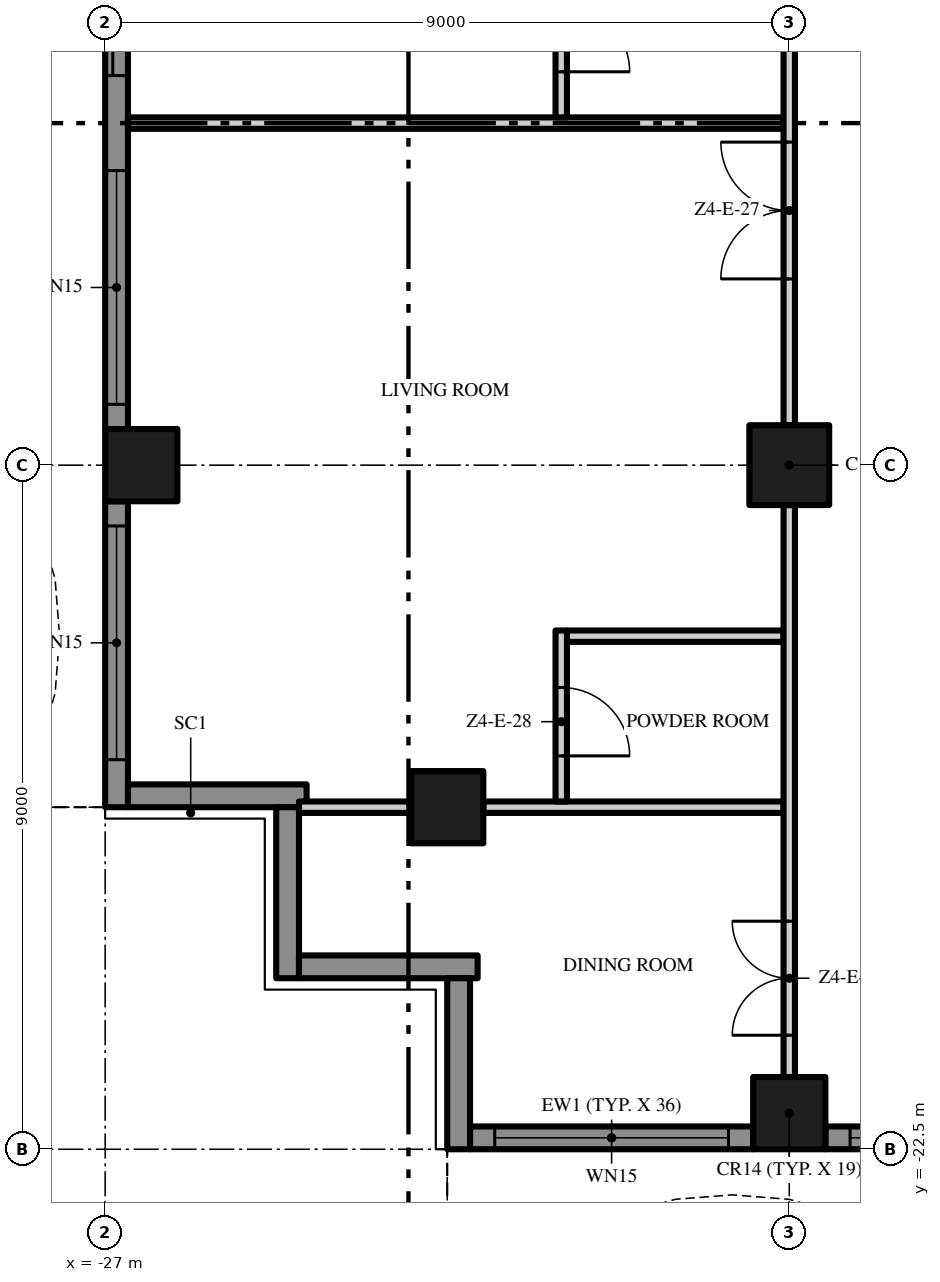
"""IFC4 building model, lengths in metres.
Left out: names, types, materials, properties, quantities, classifications, styles, units other than length and angle.
Written with IfcOpenShell. Run it as: python <this file> out.ifc"""

import sys

from ifc_helpers import new_model, si_unit, direction, frame, frame_2d, origin, origin_2d, place, context, subcontext, project, spatial, polyline, rectangle, outline, extrude, element, fill, save


model = new_model("IFC4")
c1 = context("Model", 3, precision=1e-05, world=origin(), true_north=direction((0.0, 1.0)))
c2 = subcontext(c1, "Body", "Model", "MODEL_VIEW")
j1 = project(units=[si_unit("LENGTHUNIT", "METRE"), si_unit("PLANEANGLEUNIT", "RADIAN")], contexts=[c1])
p1 = place(None, origin())
s1 = spatial("IfcSite", under=j1, at=p1, CompositionType="ELEMENT")
p2 = place(p1, origin())
s2 = spatial("IfcBuilding", under=s1, at=p2, CompositionType="ELEMENT")
p3 = place(p2, frame((0.0, 0.0, 226.2)))
s3 = spatial("IfcBuildingStorey", under=s2, at=p3, CompositionType="ELEMENT", Elevation=226.2)
p4 = place(p3, frame((-18.0, -13.5, 0.0), z_axis=(0.0, 0.0, 1.0), x_axis=(1.0, 0.0, 0.0)))
e1 = element("IfcColumn", 1, at=p4, inside=s3, PredefinedType="COLUMN", context=c2, shape_type="SweptSolid", body=[
    extrude(rectangle(XDim=1.05, YDim=1.05, at=origin_2d()), origin(), (0.0, 0.0, 1.0), 3.5),
])
for number, where, z_axis, x_axis in (
    (2, (-18.0, -22.025, 0.0), (0.0, 0.0, 1.0), (1.0, 0.0, 0.0)),
    (3, (-26.525, -13.5, 0.0), (0.0, 0.0, 1.0), (1.0, 0.0, 0.0)),
    (4, (-22.5, -18.0, 0.0), (0.0, 0.0, 1.0), (1.0, 0.0, 0.0)),
):
    element("IfcColumn", number, at=place(p3, frame(where, z_axis=z_axis, x_axis=x_axis)), inside=s3, PredefinedType="COLUMN", context=c2, shape_type="SweptSolid", body=[
        extrude(rectangle(XDim=0.95, YDim=0.95, at=origin_2d()), origin(), (0.0, 0.0, 1.0), 3.5),
    ])
p5 = place(p3, frame((-18.475, -22.35, 0.0), z_axis=(0.0, 0.0, 1.0), x_axis=(-1.0, 0.0, 0.0)))
e5 = element("IfcWall", 5, at=p5, inside=s3, PredefinedType="SOLIDWALL", context=c2, shape_type="SweptSolid", body=[
    extrude(rectangle(XDim=3.725, YDim=0.3, at=frame_2d((1.863, 0.0))), origin(), (0.0, 0.0, 1.0), 3.5),
])
p6 = place(p5, frame((0.325, 0.0, 0.45)))
e6 = element("IfcOpeningElement", 6, at=p6, cuts=e5, PredefinedType="OPENING", context=c2, shape_type="SweptSolid", body=[
    extrude(rectangle(XDim=3.075, YDim=2.65, at=frame_2d((1.538, 1.325))), frame((0.0, 0.16, 0.0), z_axis=(0.0, -1.0, 0.0), x_axis=(1.0, 0.0, 0.0)), (0.0, 0.0, 1.0), 0.32),
])
p7 = place(p3, frame((-9.475, -22.35, 0.0), z_axis=(0.0, 0.0, 1.0), x_axis=(-1.0, 0.0, 0.0)))
e7 = element("IfcWall", 7, at=p7, inside=s3, PredefinedType="SOLIDWALL", context=c2, shape_type="SweptSolid", body=[
    extrude(rectangle(XDim=8.05, YDim=0.3, at=frame_2d((4.025, 0.0))), origin(), (0.0, 0.0, 1.0), 3.5),
])
p8 = place(p7, frame((4.65, 0.0, 0.45)))
e8 = element("IfcOpeningElement", 8, at=p8, cuts=e7, PredefinedType="OPENING", context=c2, shape_type="SweptSolid", body=[
    extrude(rectangle(XDim=3.075, YDim=2.65, at=frame_2d((1.538, 1.325))), frame((0.0, 0.16, 0.0), z_axis=(0.0, -1.0, 0.0), x_axis=(1.0, 0.0, 0.0)), (0.0, 0.0, 1.0), 0.32),
])
p9 = place(p7, frame((0.325, 0.0, 0.0)))
e9 = element("IfcOpeningElement", 9, at=p9, cuts=e7, PredefinedType="OPENING", context=c2, shape_type="SweptSolid", body=[
    extrude(rectangle(XDim=3.075, YDim=2.4, at=frame_2d((1.538, 1.2))), frame((0.0, 0.16, 0.0), z_axis=(0.0, -1.0, 0.0), x_axis=(1.0, 0.0, 0.0)), (0.0, 0.0, 1.0), 0.32),
])
p10 = place(p3, frame((-26.85, -13.025, 0.0), z_axis=(0.0, 0.0, 1.0), x_axis=(0.0, 1.0, 0.0)))
e10 = element("IfcWall", 10, at=p10, inside=s3, PredefinedType="SOLIDWALL", context=c2, shape_type="SweptSolid", body=[
    extrude(rectangle(XDim=8.05, YDim=0.3, at=frame_2d((4.025, 0.0))), origin(), (0.0, 0.0, 1.0), 3.5),
])
p11 = place(p10, frame((4.65, 0.0, 0.0)))
e11 = element("IfcOpeningElement", 11, at=p11, cuts=e10, PredefinedType="OPENING", context=c2, shape_type="SweptSolid", body=[
    extrude(rectangle(XDim=3.075, YDim=2.4, at=frame_2d((1.538, 1.2))), frame((0.0, 0.16, 0.0), z_axis=(0.0, -1.0, 0.0), x_axis=(1.0, 0.0, 0.0)), (0.0, 0.0, 1.0), 0.32),
])
p12 = place(p10, frame((0.325, 0.0, 0.45)))
e12 = element("IfcOpeningElement", 12, at=p12, cuts=e10, PredefinedType="OPENING", context=c2, shape_type="SweptSolid", body=[
    extrude(rectangle(XDim=3.075, YDim=2.65, at=frame_2d((1.538, 1.325))), frame((0.0, 0.16, 0.0), z_axis=(0.0, -1.0, 0.0), x_axis=(1.0, 0.0, 0.0)), (0.0, 0.0, 1.0), 0.32),
])
p13 = place(p3, frame((-26.85, -18.0, 0.0), z_axis=(0.0, 0.0, 1.0), x_axis=(0.0, 1.0, 0.0)))
e13 = element("IfcWall", 13, at=p13, inside=s3, PredefinedType="SOLIDWALL", context=c2, shape_type="SweptSolid", body=[
    extrude(rectangle(XDim=4.025, YDim=0.3, at=frame_2d((2.013, 0.0))), origin(), (0.0, 0.0, 1.0), 3.5),
])
p14 = place(p13, frame((0.625, 0.0, 0.45)))
e14 = element("IfcOpeningElement", 14, at=p14, cuts=e13, PredefinedType="OPENING", context=c2, shape_type="SweptSolid", body=[
    extrude(rectangle(XDim=3.075, YDim=2.65, at=frame_2d((1.538, 1.325))), frame((0.0, 0.16, 0.0), z_axis=(0.0, -1.0, 0.0), x_axis=(1.0, 0.0, 0.0)), (0.0, 0.0, 1.0), 0.32),
])
p15 = place(p3, frame((-24.35, -17.85, 0.0), z_axis=(0.0, 0.0, 1.0), x_axis=(-1.0, 0.0, 0.0)))
e15 = element("IfcWall", 15, at=p15, inside=s3, PredefinedType="SOLIDWALL", context=c2, shape_type="SweptSolid", body=[
    extrude(rectangle(XDim=2.35, YDim=0.3, at=frame_2d((1.175, 0.0))), origin(), (0.0, 0.0, 1.0), 3.5),
])
p16 = place(p3, frame((-24.6, -20.25, 0.0), z_axis=(0.0, 0.0, 1.0), x_axis=(0.0, 1.0, 0.0)))
e16 = element("IfcWall", 16, at=p16, inside=s3, PredefinedType="SOLIDWALL", context=c2, shape_type="SweptSolid", body=[
    extrude(rectangle(XDim=2.25, YDim=0.3, at=frame_2d((1.125, 0.0))), origin(), (0.0, 0.0, 1.0), 3.5),
])
p17 = place(p3, frame((-22.1, -20.1, 0.0), z_axis=(0.0, 0.0, 1.0), x_axis=(-1.0, 0.0, 0.0)))
e17 = element("IfcWall", 17, at=p17, inside=s3, PredefinedType="SOLIDWALL", context=c2, shape_type="SweptSolid", body=[
    extrude(rectangle(XDim=2.35, YDim=0.3, at=frame_2d((1.175, 0.0))), origin(), (0.0, 0.0, 1.0), 3.5),
])
p18 = place(p3, frame((-22.35, -22.5, 0.0), z_axis=(0.0, 0.0, 1.0), x_axis=(0.0, 1.0, 0.0)))
e18 = element("IfcWall", 18, at=p18, inside=s3, PredefinedType="SOLIDWALL", context=c2, shape_type="SweptSolid", body=[
    extrude(rectangle(XDim=2.25, YDim=0.3, at=frame_2d((1.125, 0.0))), origin(), (0.0, 0.0, 1.0), 3.5),
])
p19 = place(p3, origin())
e19 = element("IfcWall", 19, at=p19, inside=s3, PredefinedType="USERDEFINED", context=c2, shape_type="SweptSolid", body=[
    extrude(outline(polyline([(-22.5, -24.3), (-21.0, -23.595), (-19.5, -23.159), (-18.75, -23.1), (-18.0, -23.159), (-16.5, -23.595), (-15.0, -24.3), (-13.5, -25.005), (-12.0, -25.441), (-11.25, -25.5), (-10.5, -25.441), (-9.0, -25.005), (-7.5, -24.3), (-6.0, -23.595), (-4.5, -23.159), (-3.75, -23.1), (-3.0, -23.159), (-1.5, -23.595), (0.0, -24.3), (1.5, -25.005), (3.0, -25.441), (3.75, -25.5), (4.5, -25.441), (6.0, -25.005), (7.5, -24.3), (9.0, -23.595), (10.5, -23.159), (11.25, -23.1), (12.0, -23.159), (13.5, -23.595), (15.0, -24.3), (16.5, -25.005), (18.0, -25.441), (18.75, -25.5), (19.5, -25.441), (21.0, -25.005), (22.5, -24.3), (22.394, -24.074), (20.911, -24.771), (19.455, -25.194), (18.75, -25.249), (18.045, -25.194), (16.589, -24.771), (15.106, -24.074), (13.589, -23.36), (12.045, -22.911), (11.25, -22.849), (10.455, -22.911), (8.911, -23.36), (7.394, -24.074), (5.911, -24.771), (4.455, -25.194), (3.75, -25.249), (3.045, -25.194), (1.589, -24.771), (0.106, -24.074), (-1.411, -23.36), (-2.955, -22.911), (-3.75, -22.849), (-4.545, -22.911), (-6.089, -23.36), (-7.606, -24.074), (-9.089, -24.771), (-10.545, -25.194), (-11.25, -25.249), (-11.955, -25.194), (-13.411, -24.771), (-14.894, -24.074), (-16.411, -23.36), (-17.955, -22.911), (-18.75, -22.849), (-19.545, -22.911), (-21.089, -23.36), (-22.606, -24.074), (-22.5, -24.3)])), origin(), (0.0, 0.0, 1.0), 0.9),
])
p20 = place(p3, origin())
e20 = element("IfcWall", 20, at=p20, inside=s3, PredefinedType="USERDEFINED", context=c2, shape_type="SweptSolid", body=[
    extrude(outline(polyline([(-28.8, 18.0), (-28.095, 16.5), (-27.659, 15.0), (-27.6, 14.25), (-27.659, 13.5), (-28.095, 12.0), (-28.8, 10.5), (-29.505, 9.0), (-29.941, 7.5), (-30.0, 6.75), (-29.941, 6.0), (-29.505, 4.5), (-28.8, 3.0), (-28.095, 1.5), (-27.659, 0.0), (-27.6, -0.75), (-27.659, -1.5), (-28.095, -3.0), (-28.8, -4.5), (-29.505, -6.0), (-29.941, -7.5), (-30.0, -8.25), (-29.941, -9.0), (-29.505, -10.5), (-28.8, -12.0), (-28.095, -13.5), (-27.659, -15.0), (-27.6, -15.75), (-27.659, -16.5), (-28.095, -18.0), (-27.855, -18.07), (-27.411, -16.545), (-27.349, -15.75), (-27.411, -14.955), (-27.86, -13.411), (-28.574, -11.894), (-29.271, -10.411), (-29.694, -8.955), (-29.749, -8.25), (-29.694, -7.545), (-29.271, -6.089), (-28.574, -4.606), (-27.86, -3.089), (-27.411, -1.545), (-27.349, -0.75), (-27.411, 0.045), (-27.86, 1.589), (-28.574, 3.106), (-29.271, 4.589), (-29.694, 6.045), (-29.749, 6.75), (-29.694, 7.455), (-29.271, 8.911), (-28.574, 10.394), (-27.86, 11.911), (-27.411, 13.455), (-27.349, 14.25), (-27.411, 15.045), (-27.86, 16.589), (-28.574, 18.106), (-28.8, 18.0)])), origin(), (0.0, 0.0, 1.0), 0.9),
])
p21 = place(p3, frame((-24.45, -18.0, 0.0), z_axis=(0.0, 0.0, 1.0), x_axis=(1.0, 0.0, 0.0)))
e21 = element("IfcWall", 21, at=p21, inside=s3, PredefinedType="PARTITIONING", context=c2, shape_type="SweptSolid", body=[
    extrude(rectangle(XDim=1.475, YDim=0.15, at=frame_2d((0.738, 0.0))), origin(), (0.0, 0.0, 1.0), 3.5),
])
p22 = place(p3, frame((-22.025, -18.0, 0.0), z_axis=(0.0, 0.0, 1.0), x_axis=(1.0, 0.0, 0.0)))
e22 = element("IfcWall", 22, at=p22, inside=s3, PredefinedType="PARTITIONING", context=c2, shape_type="SweptSolid", body=[
    extrude(rectangle(XDim=3.95, YDim=0.15, at=frame_2d((1.975, 0.0))), origin(), (0.0, 0.0, 1.0), 3.5),
])
p23 = place(p3, frame((-20.925, -15.75, 0.0), z_axis=(0.0, 0.0, 1.0), x_axis=(1.0, 0.0, 0.0)))
e23 = element("IfcWall", 23, at=p23, inside=s3, PredefinedType="PARTITIONING", context=c2, shape_type="SweptSolid", body=[
    extrude(rectangle(XDim=2.85, YDim=0.15, at=frame_2d((1.425, 0.0))), origin(), (0.0, 0.0, 1.0), 3.5),
])
p24 = place(p3, frame((-26.7, -9.0, 0.0), z_axis=(0.0, 0.0, 1.0), x_axis=(1.0, 0.0, 0.0)))
e24 = element("IfcWall", 24, at=p24, inside=s3, PredefinedType="PARTITIONING", context=c2, shape_type="SweptSolid", body=[
    extrude(rectangle(XDim=8.625, YDim=0.15, at=frame_2d((4.312, 0.0))), origin(), (0.0, 0.0, 1.0), 3.5),
])
p25 = place(p3, frame((-21.0, -15.675, 0.0), z_axis=(0.0, 0.0, 1.0), x_axis=(0.0, -1.0, 0.0)))
e25 = element("IfcWall", 25, at=p25, inside=s3, PredefinedType="PARTITIONING", context=c2, shape_type="SweptSolid", body=[
    extrude(rectangle(XDim=2.25, YDim=0.15, at=frame_2d((1.125, 0.0))), origin(), (0.0, 0.0, 1.0), 3.5),
])
p26 = place(p25, frame((0.75, 0.0, 0.0)))
e26 = element("IfcOpeningElement", 26, at=p26, cuts=e25, PredefinedType="OPENING", context=c2, shape_type="SweptSolid", body=[
    extrude(rectangle(XDim=0.9, YDim=2.1, at=frame_2d((0.45, 1.05))), frame((0.0, 0.085, 0.0), z_axis=(0.0, -1.0, 0.0), x_axis=(1.0, 0.0, 0.0)), (0.0, 0.0, 1.0), 0.17),
])
p27 = place(p3, frame((-21.0, -6.675, 0.0), z_axis=(0.0, 0.0, 1.0), x_axis=(0.0, -1.0, 0.0)))
e27 = element("IfcWall", 27, at=p27, inside=s3, PredefinedType="PARTITIONING", context=c2, shape_type="SweptSolid", body=[
    extrude(rectangle(XDim=2.25, YDim=0.15, at=frame_2d((1.125, 0.0))), origin(), (0.0, 0.0, 1.0), 3.5),
])
p28 = place(p27, frame((0.75, 0.0, 0.0)))
e28 = element("IfcOpeningElement", 28, at=p28, cuts=e27, PredefinedType="OPENING", context=c2, shape_type="SweptSolid", body=[
    extrude(rectangle(XDim=0.9, YDim=2.1, at=frame_2d((0.45, 1.05))), frame((0.0, 0.085, 0.0), z_axis=(0.0, -1.0, 0.0), x_axis=(1.0, 0.0, 0.0)), (0.0, 0.0, 1.0), 0.17),
])
p29 = place(p3, frame((-18.0, -21.55, 0.0), z_axis=(0.0, 0.0, 1.0), x_axis=(0.0, 1.0, 0.0)))
e29 = element("IfcWall", 29, at=p29, inside=s3, PredefinedType="PARTITIONING", context=c2, shape_type="SweptSolid", body=[
    extrude(rectangle(XDim=7.525, YDim=0.15, at=frame_2d((3.763, 0.0))), origin(), (0.0, 0.0, 1.0), 3.5),
])
p30 = place(p29, frame((0.55, 0.0, 0.0)))
e30 = element("IfcOpeningElement", 30, at=p30, cuts=e29, PredefinedType="OPENING", context=c2, shape_type="SweptSolid", body=[
    extrude(rectangle(XDim=1.5, YDim=2.4, at=frame_2d((0.75, 1.2))), frame((0.0, 0.085, 0.0), z_axis=(0.0, -1.0, 0.0), x_axis=(1.0, 0.0, 0.0)), (0.0, 0.0, 1.0), 0.17),
])
p31 = place(p3, frame((-18.0, -12.975, 0.0), z_axis=(0.0, 0.0, 1.0), x_axis=(0.0, 1.0, 0.0)))
e31 = element("IfcWall", 31, at=p31, inside=s3, PredefinedType="PARTITIONING", context=c2, shape_type="SweptSolid", body=[
    extrude(rectangle(XDim=7.95, YDim=0.15, at=frame_2d((3.975, 0.0))), origin(), (0.0, 0.0, 1.0), 3.5),
])
p32 = place(p31, frame((1.925, 0.0, 0.0)))
e32 = element("IfcOpeningElement", 32, at=p32, cuts=e31, PredefinedType="OPENING", context=c2, shape_type="SweptSolid", body=[
    extrude(rectangle(XDim=1.8, YDim=2.4, at=frame_2d((0.9, 1.2))), frame((0.0, 0.085, 0.0), z_axis=(0.0, -1.0, 0.0), x_axis=(1.0, 0.0, 0.0)), (0.0, 0.0, 1.0), 0.17),
])
p33 = place(p31, frame((6.8, 0.0, 0.0)))
e33 = element("IfcOpeningElement", 33, at=p33, cuts=e31, PredefinedType="OPENING", context=c2, shape_type="SweptSolid", body=[
    extrude(rectangle(XDim=1.0, YDim=2.4, at=frame_2d((0.5, 1.2))), frame((0.0, 0.085, 0.0), z_axis=(0.0, -1.0, 0.0), x_axis=(1.0, 0.0, 0.0)), (0.0, 0.0, 1.0), 0.17),
])
p34 = place(p6, origin())
e34 = element("IfcWindow", 34, at=p34, inside=s3, PartitioningType="SINGLE_PANEL", PredefinedType="WINDOW", context=c2, shape_type="SweptSolid", body=[
    extrude(rectangle(XDim=3.075, YDim=2.65, at=frame_2d((1.538, 1.325))), frame((0.0, 0.03, 0.0), z_axis=(0.0, -1.0, 0.0), x_axis=(1.0, 0.0, 0.0)), (0.0, 0.0, 1.0), 0.06),
])
fill(e6, e34)
p35 = place(p8, origin())
e35 = element("IfcWindow", 35, at=p35, inside=s3, PartitioningType="SINGLE_PANEL", PredefinedType="WINDOW", context=c2, shape_type="SweptSolid", body=[
    extrude(rectangle(XDim=3.075, YDim=2.65, at=frame_2d((1.538, 1.325))), frame((0.0, 0.03, 0.0), z_axis=(0.0, -1.0, 0.0), x_axis=(1.0, 0.0, 0.0)), (0.0, 0.0, 1.0), 0.06),
])
fill(e8, e35)
p36 = place(p11, origin())
e36 = element("IfcDoor", 36, at=p36, inside=s3, OperationType="SINGLE_SWING_LEFT", PredefinedType="DOOR", context=c2, shape_type="SweptSolid", body=[
    extrude(rectangle(XDim=3.075, YDim=2.4, at=frame_2d((1.538, 1.2))), frame((0.0, 0.025, 0.0), z_axis=(0.0, -1.0, 0.0), x_axis=(1.0, 0.0, 0.0)), (0.0, 0.0, 1.0), 0.05),
])
fill(e11, e36)
p37 = place(p12, origin())
e37 = element("IfcWindow", 37, at=p37, inside=s3, PartitioningType="SINGLE_PANEL", PredefinedType="WINDOW", context=c2, shape_type="SweptSolid", body=[
    extrude(rectangle(XDim=3.075, YDim=2.65, at=frame_2d((1.538, 1.325))), frame((0.0, 0.03, 0.0), z_axis=(0.0, -1.0, 0.0), x_axis=(1.0, 0.0, 0.0)), (0.0, 0.0, 1.0), 0.06),
])
fill(e12, e37)
p38 = place(p14, origin())
e38 = element("IfcWindow", 38, at=p38, inside=s3, PartitioningType="SINGLE_PANEL", PredefinedType="WINDOW", context=c2, shape_type="SweptSolid", body=[
    extrude(rectangle(XDim=3.075, YDim=2.65, at=frame_2d((1.538, 1.325))), frame((0.0, 0.03, 0.0), z_axis=(0.0, -1.0, 0.0), x_axis=(1.0, 0.0, 0.0)), (0.0, 0.0, 1.0), 0.06),
])
fill(e14, e38)
p39 = place(p30, origin())
e39 = element("IfcDoor", 39, at=p39, inside=s3, OperationType="DOUBLE_DOOR_SINGLE_SWING", PredefinedType="DOOR", context=c2, shape_type="SweptSolid", body=[
    extrude(rectangle(XDim=1.5, YDim=2.4, at=frame_2d((0.75, 1.2))), frame((0.0, 0.025, 0.0), z_axis=(0.0, -1.0, 0.0), x_axis=(1.0, 0.0, 0.0)), (0.0, 0.0, 1.0), 0.05),
])
fill(e30, e39)
p40 = place(p32, origin())
e40 = element("IfcDoor", 40, at=p40, inside=s3, OperationType="DOUBLE_DOOR_SINGLE_SWING", PredefinedType="DOOR", context=c2, shape_type="SweptSolid", body=[
    extrude(rectangle(XDim=1.8, YDim=2.4, at=frame_2d((0.9, 1.2))), frame((0.0, 0.025, 0.0), z_axis=(0.0, -1.0, 0.0), x_axis=(1.0, 0.0, 0.0)), (0.0, 0.0, 1.0), 0.05),
])
fill(e32, e40)
p41 = place(p26, origin())
e41 = element("IfcDoor", 41, at=p41, inside=s3, OperationType="SINGLE_SWING_RIGHT", PredefinedType="DOOR", context=c2, shape_type="SweptSolid", body=[
    extrude(rectangle(XDim=0.9, YDim=2.1, at=frame_2d((0.45, 1.05))), frame((0.0, 0.025, 0.0), z_axis=(0.0, -1.0, 0.0), x_axis=(1.0, 0.0, 0.0)), (0.0, 0.0, 1.0), 0.05),
])
fill(e26, e41)
p42 = place(p28, origin())
e42 = element("IfcDoor", 42, at=p42, inside=s3, OperationType="SINGLE_SWING_RIGHT", PredefinedType="DOOR", context=c2, shape_type="SweptSolid", body=[
    extrude(rectangle(XDim=0.9, YDim=2.1, at=frame_2d((0.45, 1.05))), frame((0.0, 0.025, 0.0), z_axis=(0.0, -1.0, 0.0), x_axis=(1.0, 0.0, 0.0)), (0.0, 0.0, 1.0), 0.05),
])
fill(e28, e42)
save(model, sys.argv[1])
